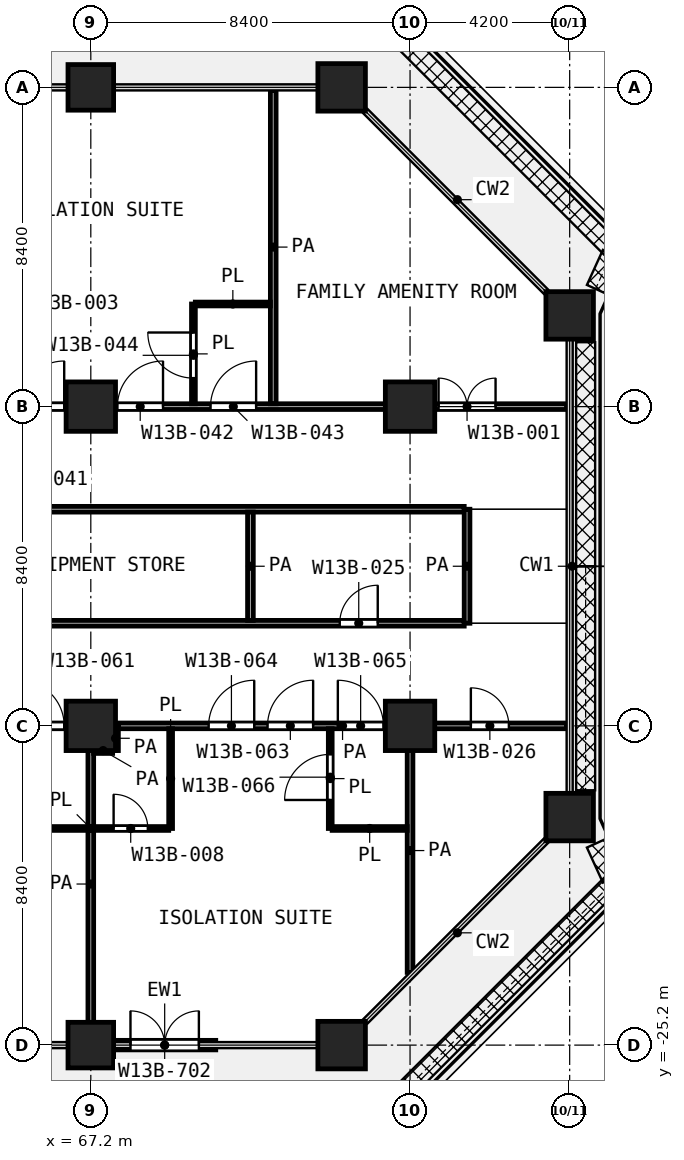
"""IFC4 building model, lengths in metres.
Left out: names, types, materials, properties, quantities, classifications, styles, units other than length and angle.
Written with IfcOpenShell. Run it as: python <this file> out.ifc"""

import sys

from ifc_helpers import new_model, si_unit, direction, frame, frame_2d, origin, origin_2d, place, context, subcontext, project, spatial, rectangle, extrude, element, fill, save


model = new_model("IFC4")
c1 = context("Model", 3, precision=1e-05, world=origin(), true_north=direction((0.0, 1.0)))
c2 = subcontext(c1, "Body", "Model", "MODEL_VIEW")
j1 = project(units=[si_unit("LENGTHUNIT", "METRE"), si_unit("PLANEANGLEUNIT", "RADIAN")], contexts=[c1])
p1 = place(None, origin())
s1 = spatial("IfcSite", under=j1, at=p1, CompositionType="ELEMENT")
p2 = place(p1, origin())
s2 = spatial("IfcBuilding", under=s1, at=p2, CompositionType="ELEMENT")
p3 = place(p2, frame((0.0, 0.0, 89.6)))
s3 = spatial("IfcBuildingStorey", under=s2, at=p3, CompositionType="ELEMENT", Elevation=89.6)
p4 = place(p3, frame((67.2, 0.0, 0.0), z_axis=(0.0, 0.0, 1.0), x_axis=(1.0, 0.0, 0.0)))
e1 = element("IfcColumn", 1, at=p4, inside=s3, PredefinedType="COLUMN", context=c2, shape_type="SweptSolid", body=[
    extrude(rectangle(XDim=1.2, YDim=1.2, at=origin_2d()), origin(), (0.0, 0.0, 1.0), 4.2),
])
for number, where, z_axis, x_axis in (
    (2, (73.8, 0.0, 0.0), (0.0, 0.0, 1.0), (1.0, 0.0, 0.0)),
    (3, (79.8, -6.0, 0.0), (0.0, 0.0, 1.0), (1.0, 0.0, 0.0)),
):
    element("IfcColumn", number, at=place(p3, frame(where, z_axis=z_axis, x_axis=x_axis)), inside=s3, PredefinedType="COLUMN", context=c2, shape_type="SweptSolid", body=[
        extrude(rectangle(XDim=1.25, YDim=1.25, at=origin_2d()), origin(), (0.0, 0.0, 1.0), 4.2),
    ])
for number, where, z_axis, x_axis in (
    (4, (67.2, -8.4, 0.0), (0.0, 0.0, 1.0), (1.0, 0.0, 0.0)),
    (5, (75.6, -8.4, 0.0), (0.0, 0.0, 1.0), (1.0, 0.0, 0.0)),
    (6, (67.2, -16.8, 0.0), (0.0, 0.0, 1.0), (1.0, 0.0, 0.0)),
    (7, (75.6, -16.8, 0.0), (0.0, 0.0, 1.0), (1.0, 0.0, 0.0)),
):
    element("IfcColumn", number, at=place(p3, frame(where, z_axis=z_axis, x_axis=x_axis)), inside=s3, PredefinedType="COLUMN", context=c2, shape_type="SweptSolid", body=[
        extrude(rectangle(XDim=1.3, YDim=1.3, at=origin_2d()), origin(), (0.0, 0.0, 1.0), 4.2),
    ])
p5 = place(p3, frame((79.8, -19.2, 0.0), z_axis=(0.0, 0.0, 1.0), x_axis=(1.0, 0.0, 0.0)))
e8 = element("IfcColumn", 8, at=p5, inside=s3, PredefinedType="COLUMN", context=c2, shape_type="SweptSolid", body=[
    extrude(rectangle(XDim=1.25, YDim=1.25, at=origin_2d()), origin(), (0.0, 0.0, 1.0), 4.2),
])
p6 = place(p3, frame((67.2, -25.2, 0.0), z_axis=(0.0, 0.0, 1.0), x_axis=(1.0, 0.0, 0.0)))
e9 = element("IfcColumn", 9, at=p6, inside=s3, PredefinedType="COLUMN", context=c2, shape_type="SweptSolid", body=[
    extrude(rectangle(XDim=1.2, YDim=1.2, at=origin_2d()), origin(), (0.0, 0.0, 1.0), 4.2),
])
p7 = place(p3, frame((73.8, -25.2, 0.0), z_axis=(0.0, 0.0, 1.0), x_axis=(1.0, 0.0, 0.0)))
e10 = element("IfcColumn", 10, at=p7, inside=s3, PredefinedType="COLUMN", context=c2, shape_type="SweptSolid", body=[
    extrude(rectangle(XDim=1.25, YDim=1.25, at=origin_2d()), origin(), (0.0, 0.0, 1.0), 4.2),
])
p8 = place(p3, frame((67.8, -25.2, 0.0), z_axis=(0.0, 0.0, 1.0), x_axis=(1.0, 0.0, 0.0)))
e11 = element("IfcWall", 11, at=p8, inside=s3, PredefinedType="SOLIDWALL", context=c2, shape_type="SweptSolid", body=[
    extrude(rectangle(XDim=2.688, YDim=0.25, at=frame_2d((1.344, 0.0))), origin(), (0.0, 0.0, 1.0), 3.58),
])
p9 = place(p8, frame((0.444, 0.0, 0.0)))
e12 = element("IfcOpeningElement", 12, at=p9, cuts=e11, PredefinedType="OPENING", context=c2, shape_type="SweptSolid", body=[
    extrude(rectangle(XDim=1.8, YDim=2.1, at=frame_2d((0.9, 1.05))), frame((0.0, 0.135, 0.0), z_axis=(0.0, -1.0, 0.0), x_axis=(1.0, 0.0, 0.0)), (0.0, 0.0, 1.0), 0.27),
])
p10 = place(p3, frame((65.15, -19.5, 0.0), z_axis=(0.0, 0.0, 1.0), x_axis=(1.0, 0.0, 0.0)))
e13 = element("IfcWall", 13, at=p10, inside=s3, PredefinedType="PARTITIONING", context=c2, shape_type="SweptSolid", body=[
    extrude(rectangle(XDim=4.1, YDim=0.1, at=frame_2d((2.05, 0.0))), origin(), (0.0, 0.0, 1.0), 3.7),
])
p11 = place(p10, frame((2.65, 0.0, 0.0)))
e14 = element("IfcOpeningElement", 14, at=p11, cuts=e13, PredefinedType="OPENING", context=c2, shape_type="SweptSolid", body=[
    extrude(rectangle(XDim=0.9, YDim=2.1, at=frame_2d((0.45, 1.05))), frame((0.0, 0.06, 0.0), z_axis=(0.0, -1.0, 0.0), x_axis=(1.0, 0.0, 0.0)), (0.0, 0.0, 1.0), 0.12),
])
p12 = place(p3, frame((73.55, -19.5, 0.0), z_axis=(0.0, 0.0, 1.0), x_axis=(1.0, 0.0, 0.0)))
e15 = element("IfcWall", 15, at=p12, inside=s3, PredefinedType="PARTITIONING", context=c2, shape_type="SweptSolid", body=[
    extrude(rectangle(XDim=1.975, YDim=0.1, at=frame_2d((0.987, 0.0))), origin(), (0.0, 0.0, 1.0), 3.7),
])
p13 = place(p3, frame((69.95, -5.7, 0.0), z_axis=(0.0, 0.0, 1.0), x_axis=(1.0, 0.0, 0.0)))
e16 = element("IfcWall", 16, at=p13, inside=s3, PredefinedType="PARTITIONING", context=c2, shape_type="SweptSolid", body=[
    extrude(rectangle(XDim=1.975, YDim=0.1, at=frame_2d((0.988, 0.0))), origin(), (0.0, 0.0, 1.0), 3.7),
])
p14 = place(p3, frame((69.3, -19.5, 0.0), z_axis=(0.0, 0.0, 1.0), x_axis=(0.0, 1.0, 0.0)))
e17 = element("IfcWall", 17, at=p14, inside=s3, PredefinedType="PARTITIONING", context=c2, shape_type="SweptSolid", body=[
    extrude(rectangle(XDim=2.625, YDim=0.1, at=frame_2d((1.312, 0.0))), origin(), (0.0, 0.0, 1.0), 3.7),
])
p15 = place(p3, frame((69.9, -8.325, 0.0), z_axis=(0.0, 0.0, 1.0), x_axis=(0.0, 1.0, 0.0)))
e18 = element("IfcWall", 18, at=p15, inside=s3, PredefinedType="PARTITIONING", context=c2, shape_type="SweptSolid", body=[
    extrude(rectangle(XDim=2.625, YDim=0.1, at=frame_2d((1.312, 0.0))), origin(), (0.0, 0.0, 1.0), 3.7),
])
p16 = place(p15, frame((0.675, 0.0, 0.0)))
e19 = element("IfcOpeningElement", 19, at=p16, cuts=e18, PredefinedType="OPENING", context=c2, shape_type="SweptSolid", body=[
    extrude(rectangle(XDim=1.2, YDim=2.1, at=frame_2d((0.6, 1.05))), frame((0.0, 0.06, 0.0), z_axis=(0.0, -1.0, 0.0), x_axis=(1.0, 0.0, 0.0)), (0.0, 0.0, 1.0), 0.12),
])
p17 = place(p3, frame((73.5, -19.5, 0.0), z_axis=(0.0, 0.0, 1.0), x_axis=(0.0, 1.0, 0.0)))
e20 = element("IfcWall", 20, at=p17, inside=s3, PredefinedType="PARTITIONING", context=c2, shape_type="SweptSolid", body=[
    extrude(rectangle(XDim=2.625, YDim=0.1, at=frame_2d((1.312, 0.0))), origin(), (0.0, 0.0, 1.0), 3.7),
])
p18 = place(p17, frame((0.75, 0.0, 0.0)))
e21 = element("IfcOpeningElement", 21, at=p18, cuts=e20, PredefinedType="OPENING", context=c2, shape_type="SweptSolid", body=[
    extrude(rectangle(XDim=1.2, YDim=2.1, at=frame_2d((0.6, 1.05))), frame((0.0, 0.06, 0.0), z_axis=(0.0, -1.0, 0.0), x_axis=(1.0, 0.0, 0.0)), (0.0, 0.0, 1.0), 0.12),
])
p19 = place(p3, frame((67.275, -17.45, 0.0), z_axis=(0.0, 0.0, 1.0), x_axis=(1.0, 0.0, 0.0)))
e22 = element("IfcWall", 22, at=p19, inside=s3, PredefinedType="PARTITIONING", context=c2, shape_type="SweptSolid", body=[
    extrude(rectangle(XDim=0.5, YDim=0.15, at=frame_2d((0.25, 0.0))), origin(), (0.0, 0.0, 1.0), 3.7),
])
p20 = place(p3, frame((59.528, -16.8, 0.0), z_axis=(0.0, 0.0, 1.0), x_axis=(1.0, 0.0, 0.0)))
e23 = element("IfcWall", 23, at=p20, inside=s3, PredefinedType="PARTITIONING", context=c2, shape_type="SweptSolid", body=[
    extrude(rectangle(XDim=7.594, YDim=0.15, at=frame_2d((3.797, 0.0))), origin(), (0.0, 0.0, 1.0), 3.7),
])
p21 = place(p20, frame((3.922, 0.0, 0.0)))
e24 = element("IfcOpeningElement", 24, at=p21, cuts=e23, PredefinedType="OPENING", context=c2, shape_type="SweptSolid", body=[
    extrude(rectangle(XDim=1.2, YDim=2.1, at=frame_2d((0.6, 1.05))), frame((0.0, 0.085, 0.0), z_axis=(0.0, -1.0, 0.0), x_axis=(1.0, 0.0, 0.0)), (0.0, 0.0, 1.0), 0.17),
])
p22 = place(p20, frame((2.372, 0.0, 0.0)))
e25 = element("IfcOpeningElement", 25, at=p22, cuts=e23, PredefinedType="OPENING", context=c2, shape_type="SweptSolid", body=[
    extrude(rectangle(XDim=1.2, YDim=2.1, at=frame_2d((0.6, 1.05))), frame((0.0, 0.085, 0.0), z_axis=(0.0, -1.0, 0.0), x_axis=(1.0, 0.0, 0.0)), (0.0, 0.0, 1.0), 0.17),
])
p23 = place(p20, frame((5.772, 0.0, 0.0)))
e26 = element("IfcOpeningElement", 26, at=p23, cuts=e23, PredefinedType="OPENING", context=c2, shape_type="SweptSolid", body=[
    extrude(rectangle(XDim=1.2, YDim=2.1, at=frame_2d((0.6, 1.05))), frame((0.0, 0.085, 0.0), z_axis=(0.0, -1.0, 0.0), x_axis=(1.0, 0.0, 0.0)), (0.0, 0.0, 1.0), 0.17),
])
p24 = place(p3, frame((67.928, -16.8, 0.0), z_axis=(0.0, 0.0, 1.0), x_axis=(1.0, 0.0, 0.0)))
e27 = element("IfcWall", 27, at=p24, inside=s3, PredefinedType="PARTITIONING", context=c2, shape_type="SweptSolid", body=[
    extrude(rectangle(XDim=11.792, YDim=0.15, at=frame_2d((5.896, 0.0))), origin(), (0.0, 0.0, 1.0), 3.7),
])
p25 = place(p24, frame((3.922, 0.0, 0.0)))
e28 = element("IfcOpeningElement", 28, at=p25, cuts=e27, PredefinedType="OPENING", context=c2, shape_type="SweptSolid", body=[
    extrude(rectangle(XDim=1.2, YDim=2.1, at=frame_2d((0.6, 1.05))), frame((0.0, 0.085, 0.0), z_axis=(0.0, -1.0, 0.0), x_axis=(1.0, 0.0, 0.0)), (0.0, 0.0, 1.0), 0.17),
])
p26 = place(p24, frame((2.372, 0.0, 0.0)))
e29 = element("IfcOpeningElement", 29, at=p26, cuts=e27, PredefinedType="OPENING", context=c2, shape_type="SweptSolid", body=[
    extrude(rectangle(XDim=1.2, YDim=2.1, at=frame_2d((0.6, 1.05))), frame((0.0, 0.085, 0.0), z_axis=(0.0, -1.0, 0.0), x_axis=(1.0, 0.0, 0.0)), (0.0, 0.0, 1.0), 0.17),
])
p27 = place(p24, frame((5.772, 0.0, 0.0)))
e30 = element("IfcOpeningElement", 30, at=p27, cuts=e27, PredefinedType="OPENING", context=c2, shape_type="SweptSolid", body=[
    extrude(rectangle(XDim=1.2, YDim=2.1, at=frame_2d((0.6, 1.05))), frame((0.0, 0.085, 0.0), z_axis=(0.0, -1.0, 0.0), x_axis=(1.0, 0.0, 0.0)), (0.0, 0.0, 1.0), 0.17),
])
p28 = place(p24, frame((9.272, 0.0, 0.0)))
e31 = element("IfcOpeningElement", 31, at=p28, cuts=e27, PredefinedType="OPENING", context=c2, shape_type="SweptSolid", body=[
    extrude(rectangle(XDim=1.0, YDim=2.1, at=frame_2d((0.5, 1.05))), frame((0.0, 0.085, 0.0), z_axis=(0.0, -1.0, 0.0), x_axis=(1.0, 0.0, 0.0)), (0.0, 0.0, 1.0), 0.17),
])
p29 = place(p3, frame((42.1, -14.1, 0.0), z_axis=(0.0, 0.0, 1.0), x_axis=(1.0, 0.0, 0.0)))
e32 = element("IfcWall", 32, at=p29, inside=s3, PredefinedType="PARTITIONING", context=c2, shape_type="SweptSolid", body=[
    extrude(rectangle(XDim=34.925, YDim=0.15, at=frame_2d((17.462, 0.0))), origin(), (0.0, 0.0, 1.0), 3.7),
])
p30 = place(p29, frame((20.55, 0.0, 0.0)))
e33 = element("IfcOpeningElement", 33, at=p30, cuts=e32, PredefinedType="OPENING", context=c2, shape_type="SweptSolid", body=[
    extrude(rectangle(XDim=1.0, YDim=2.1, at=frame_2d((0.5, 1.05))), frame((0.0, 0.085, 0.0), z_axis=(0.0, -1.0, 0.0), x_axis=(1.0, 0.0, 0.0)), (0.0, 0.0, 1.0), 0.17),
])
p31 = place(p29, frame((31.65, 0.0, 0.0)))
e34 = element("IfcOpeningElement", 34, at=p31, cuts=e32, PredefinedType="OPENING", context=c2, shape_type="SweptSolid", body=[
    extrude(rectangle(XDim=1.0, YDim=2.1, at=frame_2d((0.5, 1.05))), frame((0.0, 0.085, 0.0), z_axis=(0.0, -1.0, 0.0), x_axis=(1.0, 0.0, 0.0)), (0.0, 0.0, 1.0), 0.17),
])
p32 = place(p3, frame((42.1, -11.1, 0.0), z_axis=(0.0, 0.0, 1.0), x_axis=(1.0, 0.0, 0.0)))
e35 = element("IfcWall", 35, at=p32, inside=s3, PredefinedType="PARTITIONING", context=c2, shape_type="SweptSolid", body=[
    extrude(rectangle(XDim=34.925, YDim=0.15, at=frame_2d((17.462, 0.0))), origin(), (0.0, 0.0, 1.0), 3.7),
])
p33 = place(p32, frame((5.75, 0.0, 0.0)))
e36 = element("IfcOpeningElement", 36, at=p33, cuts=e35, PredefinedType="OPENING", context=c2, shape_type="SweptSolid", body=[
    extrude(rectangle(XDim=1.2, YDim=2.1, at=frame_2d((0.6, 1.05))), frame((0.0, 0.085, 0.0), z_axis=(0.0, -1.0, 0.0), x_axis=(1.0, 0.0, 0.0)), (0.0, 0.0, 1.0), 0.17),
])
p34 = place(p3, frame((51.0, -8.4, 0.0), z_axis=(0.0, 0.0, 1.0), x_axis=(1.0, 0.0, 0.0)))
e37 = element("IfcWall", 37, at=p34, inside=s3, PredefinedType="PARTITIONING", context=c2, shape_type="SweptSolid", body=[
    extrude(rectangle(XDim=28.72, YDim=0.15, at=frame_2d((14.36, 0.0))), origin(), (0.0, 0.0, 1.0), 3.7),
])
p35 = place(p34, frame((5.7, 0.0, 0.0)))
e38 = element("IfcOpeningElement", 38, at=p35, cuts=e37, PredefinedType="OPENING", context=c2, shape_type="SweptSolid", body=[
    extrude(rectangle(XDim=1.2, YDim=2.1, at=frame_2d((0.6, 1.05))), frame((0.0, 0.085, 0.0), z_axis=(0.0, -1.0, 0.0), x_axis=(1.0, 0.0, 0.0)), (0.0, 0.0, 1.0), 0.17),
])
p36 = place(p34, frame((8.5, 0.0, 0.0)))
e39 = element("IfcOpeningElement", 39, at=p36, cuts=e37, PredefinedType="OPENING", context=c2, shape_type="SweptSolid", body=[
    extrude(rectangle(XDim=1.2, YDim=2.1, at=frame_2d((0.6, 1.05))), frame((0.0, 0.085, 0.0), z_axis=(0.0, -1.0, 0.0), x_axis=(1.0, 0.0, 0.0)), (0.0, 0.0, 1.0), 0.17),
])
p37 = place(p34, frame((10.35, 0.0, 0.0)))
e40 = element("IfcOpeningElement", 40, at=p37, cuts=e37, PredefinedType="OPENING", context=c2, shape_type="SweptSolid", body=[
    extrude(rectangle(XDim=1.2, YDim=2.1, at=frame_2d((0.6, 1.05))), frame((0.0, 0.085, 0.0), z_axis=(0.0, -1.0, 0.0), x_axis=(1.0, 0.0, 0.0)), (0.0, 0.0, 1.0), 0.17),
])
p38 = place(p34, frame((14.3, 0.0, 0.0)))
e41 = element("IfcOpeningElement", 41, at=p38, cuts=e37, PredefinedType="OPENING", context=c2, shape_type="SweptSolid", body=[
    extrude(rectangle(XDim=1.2, YDim=2.1, at=frame_2d((0.6, 1.05))), frame((0.0, 0.085, 0.0), z_axis=(0.0, -1.0, 0.0), x_axis=(1.0, 0.0, 0.0)), (0.0, 0.0, 1.0), 0.17),
])
p39 = place(p34, frame((16.9, 0.0, 0.0)))
e42 = element("IfcOpeningElement", 42, at=p39, cuts=e37, PredefinedType="OPENING", context=c2, shape_type="SweptSolid", body=[
    extrude(rectangle(XDim=1.2, YDim=2.1, at=frame_2d((0.6, 1.05))), frame((0.0, 0.085, 0.0), z_axis=(0.0, -1.0, 0.0), x_axis=(1.0, 0.0, 0.0)), (0.0, 0.0, 1.0), 0.17),
])
p40 = place(p34, frame((19.35, 0.0, 0.0)))
e43 = element("IfcOpeningElement", 43, at=p40, cuts=e37, PredefinedType="OPENING", context=c2, shape_type="SweptSolid", body=[
    extrude(rectangle(XDim=1.2, YDim=2.1, at=frame_2d((0.6, 1.05))), frame((0.0, 0.085, 0.0), z_axis=(0.0, -1.0, 0.0), x_axis=(1.0, 0.0, 0.0)), (0.0, 0.0, 1.0), 0.17),
])
p41 = place(p34, frame((25.35, 0.0, 0.0)))
e44 = element("IfcOpeningElement", 44, at=p41, cuts=e37, PredefinedType="OPENING", context=c2, shape_type="SweptSolid", body=[
    extrude(rectangle(XDim=1.5, YDim=2.1, at=frame_2d((0.75, 1.05))), frame((0.0, 0.085, 0.0), z_axis=(0.0, -1.0, 0.0), x_axis=(1.0, 0.0, 0.0)), (0.0, 0.0, 1.0), 0.17),
])
p42 = place(p3, frame((67.2, -25.12, 0.0), z_axis=(0.0, 0.0, 1.0), x_axis=(0.0, 1.0, 0.0)))
e45 = element("IfcWall", 45, at=p42, inside=s3, PredefinedType="PARTITIONING", context=c2, shape_type="SweptSolid", body=[
    extrude(rectangle(XDim=8.317, YDim=0.15, at=frame_2d((4.159, 0.0))), origin(), (0.0, 0.0, 1.0), 3.7),
])
p43 = place(p3, frame((67.85, -17.45, 0.0), z_axis=(0.0, 0.0, 1.0), x_axis=(0.0, 1.0, 0.0)))
e46 = element("IfcWall", 46, at=p43, inside=s3, PredefinedType="PARTITIONING", context=c2, shape_type="SweptSolid", body=[
    extrude(rectangle(XDim=0.647, YDim=0.15, at=frame_2d((0.323, 0.0))), origin(), (0.0, 0.0, 1.0), 3.7),
])
p44 = place(p3, frame((71.4, -14.025, 0.0), z_axis=(0.0, 0.0, 1.0), x_axis=(0.0, 1.0, 0.0)))
e47 = element("IfcWall", 47, at=p44, inside=s3, PredefinedType="PARTITIONING", context=c2, shape_type="SweptSolid", body=[
    extrude(rectangle(XDim=2.85, YDim=0.15, at=frame_2d((1.425, 0.0))), origin(), (0.0, 0.0, 1.0), 3.7),
])
p45 = place(p3, frame((72.0, -8.325, 0.0), z_axis=(0.0, 0.0, 1.0), x_axis=(0.0, 1.0, 0.0)))
e48 = element("IfcWall", 48, at=p45, inside=s3, PredefinedType="PARTITIONING", context=c2, shape_type="SweptSolid", body=[
    extrude(rectangle(XDim=8.245, YDim=0.15, at=frame_2d((4.123, 0.0))), origin(), (0.0, 0.0, 1.0), 3.7),
])
p46 = place(p3, frame((75.6, -23.287, 0.0), z_axis=(0.0, 0.0, 1.0), x_axis=(0.0, 1.0, 0.0)))
e49 = element("IfcWall", 49, at=p46, inside=s3, PredefinedType="PARTITIONING", context=c2, shape_type="SweptSolid", body=[
    extrude(rectangle(XDim=6.412, YDim=0.15, at=frame_2d((3.206, 0.0))), origin(), (0.0, 0.0, 1.0), 3.7),
])
p47 = place(p3, frame((77.1, -14.1, 0.0), z_axis=(0.0, 0.0, 1.0), x_axis=(0.0, 1.0, 0.0)))
e50 = element("IfcWall", 50, at=p47, inside=s3, PredefinedType="PARTITIONING", context=c2, shape_type="SweptSolid", body=[
    extrude(rectangle(XDim=3.0, YDim=0.15, at=frame_2d((1.5, 0.0))), origin(), (0.0, 0.0, 1.0), 3.7),
])
p48 = place(p9, origin())
e51 = element("IfcDoor", 51, at=p48, inside=s3, OperationType="DOUBLE_DOOR_SINGLE_SWING", PredefinedType="DOOR", context=c2, shape_type="SweptSolid", body=[
    extrude(rectangle(XDim=1.8, YDim=2.1, at=frame_2d((0.9, 1.05))), frame((0.0, 0.025, 0.0), z_axis=(0.0, -1.0, 0.0), x_axis=(1.0, 0.0, 0.0)), (0.0, 0.0, 1.0), 0.05),
])
fill(e12, e51)
p49 = place(p38, origin())
e52 = element("IfcDoor", 52, at=p49, inside=s3, OperationType="SINGLE_SWING_RIGHT", PredefinedType="DOOR", context=c2, shape_type="SweptSolid", body=[
    extrude(rectangle(XDim=1.2, YDim=2.1, at=frame_2d((0.6, 1.05))), frame((0.0, 0.025, 0.0), z_axis=(0.0, -1.0, 0.0), x_axis=(1.0, 0.0, 0.0)), (0.0, 0.0, 1.0), 0.05),
])
fill(e41, e52)
p50 = place(p39, origin())
e53 = element("IfcDoor", 53, at=p50, inside=s3, OperationType="SINGLE_SWING_RIGHT", PredefinedType="DOOR", context=c2, shape_type="SweptSolid", body=[
    extrude(rectangle(XDim=1.2, YDim=2.1, at=frame_2d((0.6, 1.05))), frame((0.0, 0.025, 0.0), z_axis=(0.0, -1.0, 0.0), x_axis=(1.0, 0.0, 0.0)), (0.0, 0.0, 1.0), 0.05),
])
fill(e42, e53)
p51 = place(p40, origin())
e54 = element("IfcDoor", 54, at=p51, inside=s3, OperationType="SINGLE_SWING_RIGHT", PredefinedType="DOOR", context=c2, shape_type="SweptSolid", body=[
    extrude(rectangle(XDim=1.2, YDim=2.1, at=frame_2d((0.6, 1.05))), frame((0.0, 0.025, 0.0), z_axis=(0.0, -1.0, 0.0), x_axis=(1.0, 0.0, 0.0)), (0.0, 0.0, 1.0), 0.05),
])
fill(e43, e54)
p52 = place(p16, origin())
e55 = element("IfcDoor", 55, at=p52, inside=s3, OperationType="SINGLE_SWING_RIGHT", PredefinedType="DOOR", context=c2, shape_type="SweptSolid", body=[
    extrude(rectangle(XDim=1.2, YDim=2.1, at=frame_2d((0.6, 1.05))), frame((0.0, 0.025, 0.0), z_axis=(0.0, -1.0, 0.0), x_axis=(1.0, 0.0, 0.0)), (0.0, 0.0, 1.0), 0.05),
])
fill(e19, e55)
p53 = place(p41, origin())
e56 = element("IfcDoor", 56, at=p53, inside=s3, OperationType="DOUBLE_DOOR_SINGLE_SWING", PredefinedType="DOOR", context=c2, shape_type="SweptSolid", body=[
    extrude(rectangle(XDim=1.5, YDim=2.1, at=frame_2d((0.75, 1.05))), frame((0.0, 0.025, 0.0), z_axis=(0.0, -1.0, 0.0), x_axis=(1.0, 0.0, 0.0)), (0.0, 0.0, 1.0), 0.05),
])
fill(e44, e56)
p54 = place(p31, origin())
e57 = element("IfcDoor", 57, at=p54, inside=s3, OperationType="SINGLE_SWING_RIGHT", PredefinedType="DOOR", context=c2, shape_type="SweptSolid", body=[
    extrude(rectangle(XDim=1.0, YDim=2.1, at=frame_2d((0.5, 1.05))), frame((0.0, 0.025, 0.0), z_axis=(0.0, -1.0, 0.0), x_axis=(1.0, 0.0, 0.0)), (0.0, 0.0, 1.0), 0.05),
])
fill(e34, e57)
p55 = place(p23, origin())
e58 = element("IfcDoor", 58, at=p55, inside=s3, OperationType="SINGLE_SWING_LEFT", PredefinedType="DOOR", context=c2, shape_type="SweptSolid", body=[
    extrude(rectangle(XDim=1.2, YDim=2.1, at=frame_2d((0.6, 1.05))), frame((0.0, 0.025, 0.0), z_axis=(0.0, -1.0, 0.0), x_axis=(1.0, 0.0, 0.0)), (0.0, 0.0, 1.0), 0.05),
])
fill(e26, e58)
p56 = place(p25, origin())
e59 = element("IfcDoor", 59, at=p56, inside=s3, OperationType="SINGLE_SWING_RIGHT", PredefinedType="DOOR", context=c2, shape_type="SweptSolid", body=[
    extrude(rectangle(XDim=1.2, YDim=2.1, at=frame_2d((0.6, 1.05))), frame((0.0, 0.025, 0.0), z_axis=(0.0, -1.0, 0.0), x_axis=(1.0, 0.0, 0.0)), (0.0, 0.0, 1.0), 0.05),
])
fill(e28, e59)
p57 = place(p26, origin())
e60 = element("IfcDoor", 60, at=p57, inside=s3, OperationType="SINGLE_SWING_RIGHT", PredefinedType="DOOR", context=c2, shape_type="SweptSolid", body=[
    extrude(rectangle(XDim=1.2, YDim=2.1, at=frame_2d((0.6, 1.05))), frame((0.0, 0.025, 0.0), z_axis=(0.0, -1.0, 0.0), x_axis=(1.0, 0.0, 0.0)), (0.0, 0.0, 1.0), 0.05),
])
fill(e29, e60)
p58 = place(p27, origin())
e61 = element("IfcDoor", 61, at=p58, inside=s3, OperationType="SINGLE_SWING_LEFT", PredefinedType="DOOR", context=c2, shape_type="SweptSolid", body=[
    extrude(rectangle(XDim=1.2, YDim=2.1, at=frame_2d((0.6, 1.05))), frame((0.0, 0.025, 0.0), z_axis=(0.0, -1.0, 0.0), x_axis=(1.0, 0.0, 0.0)), (0.0, 0.0, 1.0), 0.05),
])
fill(e30, e61)
p59 = place(p18, origin())
e62 = element("IfcDoor", 62, at=p59, inside=s3, OperationType="SINGLE_SWING_LEFT", PredefinedType="DOOR", context=c2, shape_type="SweptSolid", body=[
    extrude(rectangle(XDim=1.2, YDim=2.1, at=frame_2d((0.6, 1.05))), frame((0.0, 0.025, 0.0), z_axis=(0.0, -1.0, 0.0), x_axis=(1.0, 0.0, 0.0)), (0.0, 0.0, 1.0), 0.05),
])
fill(e21, e62)
p60 = place(p11, origin())
e63 = element("IfcDoor", 63, at=p60, inside=s3, OperationType="SINGLE_SWING_LEFT", PredefinedType="DOOR", context=c2, shape_type="SweptSolid", body=[
    extrude(rectangle(XDim=0.9, YDim=2.1, at=frame_2d((0.45, 1.05))), frame((0.0, 0.025, 0.0), z_axis=(0.0, -1.0, 0.0), x_axis=(1.0, 0.0, 0.0)), (0.0, 0.0, 1.0), 0.05),
])
fill(e14, e63)
p61 = place(p28, origin())
e64 = element("IfcDoor", 64, at=p61, inside=s3, OperationType="SINGLE_SWING_LEFT", PredefinedType="DOOR", context=c2, shape_type="SweptSolid", body=[
    extrude(rectangle(XDim=1.0, YDim=2.1, at=frame_2d((0.5, 1.05))), frame((0.0, 0.025, 0.0), z_axis=(0.0, -1.0, 0.0), x_axis=(1.0, 0.0, 0.0)), (0.0, 0.0, 1.0), 0.05),
])
fill(e31, e64)
save(model, sys.argv[1])
